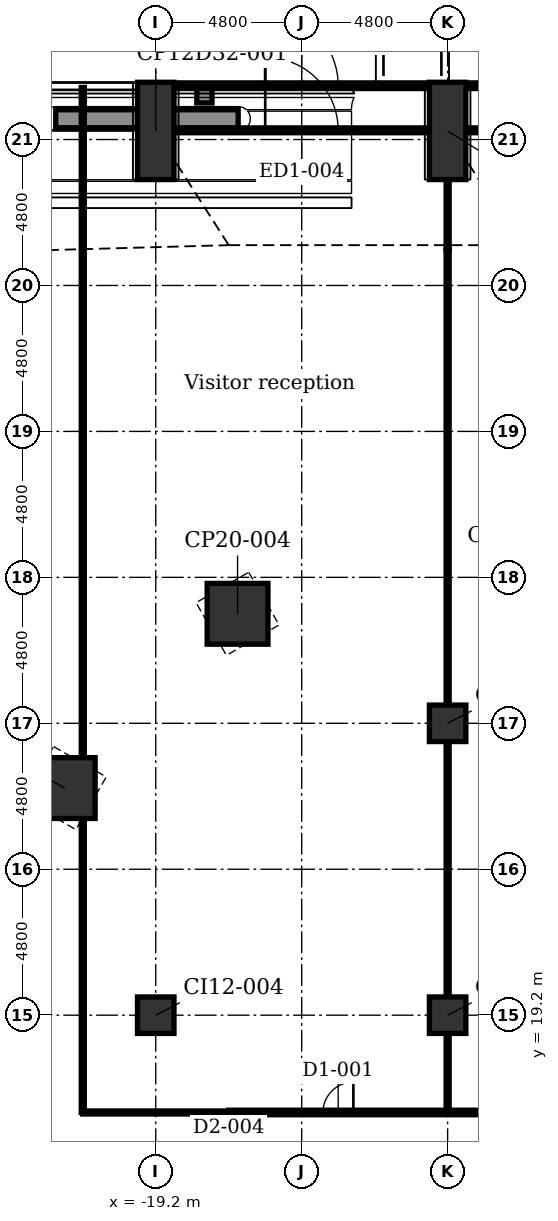
"""IFC4 building model, lengths in metres.
Left out: names, types, materials, properties, quantities, classifications, styles, units other than length and angle.
Written with IfcOpenShell. Run it as: python <this file> out.ifc"""

import sys

from ifc_helpers import new_model, si_unit, direction, frame, frame_2d, origin, origin_2d, place, context, subcontext, project, spatial, rectangle, extrude, element, fill, save


model = new_model("IFC4")
c1 = context("Model", 3, precision=1e-05, world=origin(), true_north=direction((0.0, 1.0)))
c2 = subcontext(c1, "Body", "Model", "MODEL_VIEW")
j1 = project(units=[si_unit("LENGTHUNIT", "METRE"), si_unit("PLANEANGLEUNIT", "RADIAN")], contexts=[c1])
p1 = place(None, origin())
s1 = spatial("IfcSite", under=j1, at=p1, CompositionType="ELEMENT")
p2 = place(p1, origin())
s2 = spatial("IfcBuilding", under=s1, at=p2, CompositionType="ELEMENT")
p3 = place(p2, origin())
s3 = spatial("IfcBuildingStorey", under=s2, at=p3, CompositionType="ELEMENT", Elevation=0.0)
for number, where, z_axis, x_axis in (
    (1, (-19.2, 48.283, -0.4), (0.0, 0.0, 1.0), (1.0, 0.0, 0.0)),
    (2, (-9.6, 48.283, -0.4), (0.0, 0.0, 1.0), (1.0, 0.0, 0.0)),
):
    element("IfcColumn", number, at=place(p3, frame(where, z_axis=z_axis, x_axis=x_axis)), inside=s3, PredefinedType="COLUMN", context=c2, shape_type="SweptSolid", body=[
        extrude(rectangle(XDim=1.2, YDim=3.2, at=origin_2d()), origin(), (0.0, 0.0, 1.0), 7.1),
    ])
for number, where, z_axis, x_axis in (
    (3, (-22.194, 26.67, -0.4), (0.0, 0.0, 1.0), (0.5, 0.866, 0.0)),
    (4, (-16.509, 32.401, -0.4), (0.0, 0.0, 1.0), (0.866, 0.5, 0.0)),
):
    element("IfcColumn", number, at=place(p3, frame(where, z_axis=z_axis, x_axis=x_axis)), inside=s3, PredefinedType="COLUMN", context=c2, shape_type="SweptSolid", body=[
        extrude(rectangle(XDim=2.0, YDim=2.0, at=origin_2d()), origin(), (0.0, 0.0, 1.0), 7.1),
    ])
for number, where, z_axis, x_axis in (
    (5, (-19.2, 19.2, -0.4), (0.0, 0.0, 1.0), (1.0, 0.0, 0.0)),
    (6, (-9.6, 19.2, -0.4), (0.0, 0.0, 1.0), (1.0, 0.0, 0.0)),
    (7, (-9.6, 28.8, -0.4), (0.0, 0.0, 1.0), (1.0, 0.0, 0.0)),
):
    element("IfcColumn", number, at=place(p3, frame(where, z_axis=z_axis, x_axis=x_axis)), inside=s3, PredefinedType="COLUMN", context=c2, shape_type="SweptSolid", body=[
        extrude(rectangle(XDim=1.2, YDim=1.2, at=origin_2d()), origin(), (0.0, 0.0, 1.0), 7.1),
    ])
p4 = place(p3, frame((-18.598, 48.303, 0.0), z_axis=(0.0, 0.0, 1.0), x_axis=(1.0, 0.0, 0.0)))
e8 = element("IfcWall", 8, at=p4, inside=s3, PredefinedType="PARTITIONING", context=c2, shape_type="SweptSolid", body=[
    extrude(rectangle(XDim=8.396, YDim=0.16, at=frame_2d((4.198, 0.0))), origin(), (0.0, 0.0, 1.0), 6.7),
])
p5 = place(p4, frame((2.998, 0.0, 0.0)))
e9 = element("IfcOpeningElement", 9, at=p5, cuts=e8, PredefinedType="OPENING", context=c2, shape_type="SweptSolid", body=[
    extrude(rectangle(XDim=2.4, YDim=2.4, at=frame_2d((1.2, 1.2))), frame((0.0, 0.09, 0.0), z_axis=(0.0, -1.0, 0.0), x_axis=(1.0, 0.0, 0.0)), (0.0, 0.0, 1.0), 0.18),
])
p6 = place(p3, frame((-8.998, 48.303, 0.0), z_axis=(0.0, 0.0, 1.0), x_axis=(1.0, 0.0, 0.0)))
e10 = element("IfcWall", 10, at=p6, inside=s3, PredefinedType="PARTITIONING", context=c2, shape_type="SweptSolid", body=[
    extrude(rectangle(XDim=8.396, YDim=0.16, at=frame_2d((4.198, 0.0))), origin(), (0.0, 0.0, 1.0), 6.7),
])
p7 = place(p6, frame((2.998, 0.0, 0.0)))
e11 = element("IfcOpeningElement", 11, at=p7, cuts=e10, PredefinedType="OPENING", context=c2, shape_type="SweptSolid", body=[
    extrude(rectangle(XDim=2.4, YDim=2.4, at=frame_2d((1.2, 1.2))), frame((0.0, 0.09, 0.0), z_axis=(0.0, -1.0, 0.0), x_axis=(1.0, 0.0, 0.0)), (0.0, 0.0, 1.0), 0.18),
])
p8 = place(p3, frame((-18.596, 49.783, 0.0), z_axis=(0.0, 0.0, 1.0), x_axis=(1.0, 0.0, 0.0)))
e12 = element("IfcWall", 12, at=p8, inside=s3, PredefinedType="PARTITIONING", context=c2, shape_type="SweptSolid", body=[
    extrude(rectangle(XDim=8.392, YDim=0.16, at=frame_2d((4.196, 0.0))), origin(), (0.0, 0.0, 1.0), 6.7),
])
p9 = place(p8, frame((2.996, 0.0, 0.0)))
e13 = element("IfcOpeningElement", 13, at=p9, cuts=e12, PredefinedType="OPENING", context=c2, shape_type="SweptSolid", body=[
    extrude(rectangle(XDim=2.4, YDim=2.4, at=frame_2d((1.2, 1.2))), frame((0.0, 0.09, 0.0), z_axis=(0.0, -1.0, 0.0), x_axis=(1.0, 0.0, 0.0)), (0.0, 0.0, 1.0), 0.18),
])
p10 = place(p3, frame((-8.996, 49.783, 0.0), z_axis=(0.0, 0.0, 1.0), x_axis=(1.0, 0.0, 0.0)))
e14 = element("IfcWall", 14, at=p10, inside=s3, PredefinedType="PARTITIONING", context=c2, shape_type="SweptSolid", body=[
    extrude(rectangle(XDim=8.392, YDim=0.16, at=frame_2d((4.196, 0.0))), origin(), (0.0, 0.0, 1.0), 6.7),
])
p11 = place(p10, frame((2.996, 0.0, 0.0)))
e15 = element("IfcOpeningElement", 15, at=p11, cuts=e14, PredefinedType="OPENING", context=c2, shape_type="SweptSolid", body=[
    extrude(rectangle(XDim=2.4, YDim=2.4, at=frame_2d((1.2, 1.2))), frame((0.0, 0.09, 0.0), z_axis=(0.0, -1.0, 0.0), x_axis=(1.0, 0.0, 0.0)), (0.0, 0.0, 1.0), 0.18),
])
p12 = place(p3, frame((-22.489, 48.683, 7.0), z_axis=(0.0, 0.0, 1.0), x_axis=(1.0, 0.0, 0.0)))
e16 = element("IfcWall", 16, at=p12, inside=s3, PredefinedType="USERDEFINED", context=c2, shape_type="SweptSolid", body=[
    extrude(rectangle(XDim=6.0, YDim=0.6, at=frame_2d((3.0, 0.0))), origin(), (0.0, 0.0, 1.0), 0.7),
])
p13 = place(p3, frame((-17.85, 49.453, 0.0), z_axis=(0.0, 0.0, 1.0), x_axis=(1.0, 0.0, 0.0)))
e17 = element("IfcWall", 17, at=p13, inside=s3, PredefinedType="SOLIDWALL", context=c2, shape_type="SweptSolid", body=[
    extrude(rectangle(XDim=0.5, YDim=0.5, at=frame_2d((0.25, 0.0))), origin(), (0.0, 0.0, 1.0), 6.4),
])
p14 = place(p3, frame((-9.6, 29.36, 0.0), z_axis=(0.0, 0.0, 1.0), x_axis=(0.0, 1.0, 0.0)))
e18 = element("IfcWall", 18, at=p14, inside=s3, PredefinedType="PARTITIONING", context=c2, shape_type="SweptSolid", body=[
    extrude(rectangle(XDim=15.006, YDim=0.1, at=frame_2d((7.503, 0.0))), origin(), (0.0, 0.0, 1.0), 6.016),
])
p15 = place(p3, frame((-9.6, 16.0, 0.0), z_axis=(0.0, 0.0, 1.0), x_axis=(0.0, 1.0, 0.0)))
e19 = element("IfcWall", 19, at=p15, inside=s3, PredefinedType="PARTITIONING", context=c2, shape_type="SweptSolid", body=[
    extrude(rectangle(XDim=2.64, YDim=0.1, at=frame_2d((1.32, 0.0))), origin(), (0.0, 0.0, 1.0), 6.293),
])
p16 = place(p3, frame((-9.6, 18.64, 0.0), z_axis=(0.0, 0.0, 1.0), x_axis=(0.0, 1.0, 0.0)))
e20 = element("IfcWall", 20, at=p16, inside=s3, PredefinedType="PARTITIONING", context=c2, shape_type="SweptSolid", body=[
    extrude(rectangle(XDim=1.12, YDim=0.1, at=frame_2d((0.56, 0.0))), origin(), (0.0, 0.0, 1.0), 6.7),
])
p17 = place(p3, frame((-9.6, 19.76, 0.0), z_axis=(0.0, 0.0, 1.0), x_axis=(0.0, 1.0, 0.0)))
e21 = element("IfcWall", 21, at=p17, inside=s3, PredefinedType="PARTITIONING", context=c2, shape_type="SweptSolid", body=[
    extrude(rectangle(XDim=8.48, YDim=0.1, at=frame_2d((4.24, 0.0))), origin(), (0.0, 0.0, 1.0), 6.293),
])
p18 = place(p3, frame((-9.6, 28.24, 0.0), z_axis=(0.0, 0.0, 1.0), x_axis=(0.0, 1.0, 0.0)))
e22 = element("IfcWall", 22, at=p18, inside=s3, PredefinedType="PARTITIONING", context=c2, shape_type="SweptSolid", body=[
    extrude(rectangle(XDim=1.12, YDim=0.1, at=frame_2d((0.56, 0.0))), origin(), (0.0, 0.0, 1.0), 6.7),
])
p19 = place(p3, frame((-9.6, 44.366, 0.0), z_axis=(0.0, 0.0, 1.0), x_axis=(0.0, 1.0, 0.0)))
e23 = element("IfcWall", 23, at=p19, inside=s3, PredefinedType="PARTITIONING", context=c2, shape_type="SweptSolid", body=[
    extrude(rectangle(XDim=5.347, YDim=0.1, at=frame_2d((2.673, 0.0))), origin(), (0.0, 0.0, 1.0), 6.7),
])
p20 = place(p3, frame((-16.8, 3.95, 0.0), z_axis=(0.0, 0.0, 1.0), x_axis=(0.0, 1.0, 0.0)))
e24 = element("IfcWall", 24, at=p20, inside=s3, PredefinedType="PARTITIONING", context=c2, shape_type="SweptSolid", body=[
    extrude(rectangle(XDim=12.05, YDim=0.15, at=frame_2d((6.025, 0.0))), origin(), (0.0, 0.0, 1.0), 6.7),
])
p21 = place(p20, frame((0.95, 0.0, 0.0)))
e25 = element("IfcOpeningElement", 25, at=p21, cuts=e24, PredefinedType="OPENING", context=c2, shape_type="SweptSolid", body=[
    extrude(rectangle(XDim=1.0, YDim=2.1, at=frame_2d((0.5, 1.05))), frame((0.0, 0.085, 0.0), z_axis=(0.0, -1.0, 0.0), x_axis=(1.0, 0.0, 0.0)), (0.0, 0.0, 1.0), 0.17),
])
p22 = place(p20, frame((8.645, 0.0, 0.0)))
e26 = element("IfcOpeningElement", 26, at=p22, cuts=e24, PredefinedType="OPENING", context=c2, shape_type="SweptSolid", body=[
    extrude(rectangle(XDim=1.8, YDim=2.1, at=frame_2d((0.9, 1.05))), frame((0.0, 0.085, 0.0), z_axis=(0.0, -1.0, 0.0), x_axis=(1.0, 0.0, 0.0)), (0.0, 0.0, 1.0), 0.17),
])
p23 = place(p3, frame((-21.6, 16.0, 0.0), z_axis=(0.0, 0.0, 1.0), x_axis=(0.0, 1.0, 0.0)))
e27 = element("IfcWall", 27, at=p23, inside=s3, PredefinedType="PARTITIONING", context=c2, shape_type="SweptSolid", body=[
    extrude(rectangle(XDim=33.713, YDim=0.1, at=frame_2d((16.856, 0.0))), origin(), (0.0, 0.0, 1.0), 6.7),
])
p24 = place(p3, frame((-21.6, 16.0, 0.0), z_axis=(0.0, 0.0, 1.0), x_axis=(1.0, 0.0, 0.0)))
e28 = element("IfcWall", 28, at=p24, inside=s3, PredefinedType="PARTITIONING", context=c2, shape_type="SweptSolid", body=[
    extrude(rectangle(XDim=4.8, YDim=0.1, at=frame_2d((2.4, 0.0))), origin(), (0.0, 0.0, 1.0), 6.7),
])
p25 = place(p3, frame((-16.8, 16.0, 0.0), z_axis=(0.0, 0.0, 1.0), x_axis=(1.0, 0.0, 0.0)))
e29 = element("IfcWall", 29, at=p25, inside=s3, PredefinedType="PARTITIONING", context=c2, shape_type="SweptSolid", body=[
    extrude(rectangle(XDim=33.6, YDim=0.15, at=frame_2d((16.8, 0.0))), origin(), (0.0, 0.0, 1.0), 6.7),
])
p26 = place(p25, frame((3.1, 0.0, 0.0)))
e30 = element("IfcOpeningElement", 30, at=p26, cuts=e29, PredefinedType="OPENING", context=c2, shape_type="SweptSolid", body=[
    extrude(rectangle(XDim=1.0, YDim=2.1, at=frame_2d((0.5, 1.05))), frame((0.0, 0.085, 0.0), z_axis=(0.0, -1.0, 0.0), x_axis=(1.0, 0.0, 0.0)), (0.0, 0.0, 1.0), 0.17),
])
p27 = place(p25, frame((12.1, 0.0, 0.0)))
e31 = element("IfcOpeningElement", 31, at=p27, cuts=e29, PredefinedType="OPENING", context=c2, shape_type="SweptSolid", body=[
    extrude(rectangle(XDim=1.0, YDim=2.1, at=frame_2d((0.5, 1.05))), frame((0.0, 0.085, 0.0), z_axis=(0.0, -1.0, 0.0), x_axis=(1.0, 0.0, 0.0)), (0.0, 0.0, 1.0), 0.17),
])
p28 = place(p25, frame((29.5, 0.0, 0.0)))
e32 = element("IfcOpeningElement", 32, at=p28, cuts=e29, PredefinedType="OPENING", context=c2, shape_type="SweptSolid", body=[
    extrude(rectangle(XDim=1.0, YDim=2.1, at=frame_2d((0.5, 1.05))), frame((0.0, 0.085, 0.0), z_axis=(0.0, -1.0, 0.0), x_axis=(1.0, 0.0, 0.0)), (0.0, 0.0, 1.0), 0.17),
])
p29 = place(p25, frame((23.735, 0.0, 0.0)))
e33 = element("IfcOpeningElement", 33, at=p29, cuts=e29, PredefinedType="OPENING", context=c2, shape_type="SweptSolid", body=[
    extrude(rectangle(XDim=1.0, YDim=2.1, at=frame_2d((0.5, 1.05))), frame((0.0, 0.085, 0.0), z_axis=(0.0, -1.0, 0.0), x_axis=(1.0, 0.0, 0.0)), (0.0, 0.0, 1.0), 0.17),
])
p30 = place(p25, frame((18.4, 0.0, 0.0)))
e34 = element("IfcOpeningElement", 34, at=p30, cuts=e29, PredefinedType="OPENING", context=c2, shape_type="SweptSolid", body=[
    extrude(rectangle(XDim=1.0, YDim=2.1, at=frame_2d((0.5, 1.05))), frame((0.0, 0.085, 0.0), z_axis=(0.0, -1.0, 0.0), x_axis=(1.0, 0.0, 0.0)), (0.0, 0.0, 1.0), 0.17),
])
p31 = place(p5, origin())
e35 = element("IfcDoor", 35, at=p31, inside=s3, OperationType="DOUBLE_DOOR_DOUBLE_SWING", PredefinedType="DOOR", context=c2, shape_type="SweptSolid", body=[
    extrude(rectangle(XDim=2.4, YDim=2.4, at=frame_2d((1.2, 1.2))), frame((0.0, 0.025, 0.0), z_axis=(0.0, -1.0, 0.0), x_axis=(1.0, 0.0, 0.0)), (0.0, 0.0, 1.0), 0.05),
])
fill(e9, e35)
p32 = place(p9, origin())
e36 = element("IfcDoor", 36, at=p32, inside=s3, OperationType="DOUBLE_DOOR_DOUBLE_SWING", PredefinedType="DOOR", context=c2, shape_type="SweptSolid", body=[
    extrude(rectangle(XDim=2.4, YDim=2.4, at=frame_2d((1.2, 1.2))), frame((0.0, 0.025, 0.0), z_axis=(0.0, -1.0, 0.0), x_axis=(1.0, 0.0, 0.0)), (0.0, 0.0, 1.0), 0.05),
])
fill(e13, e36)
p33 = place(p26, origin())
e37 = element("IfcDoor", 37, at=p33, inside=s3, OperationType="SINGLE_SWING_RIGHT", PredefinedType="DOOR", context=c2, shape_type="SweptSolid", body=[
    extrude(rectangle(XDim=1.0, YDim=2.1, at=frame_2d((0.5, 1.05))), frame((0.0, 0.025, 0.0), z_axis=(0.0, -1.0, 0.0), x_axis=(1.0, 0.0, 0.0)), (0.0, 0.0, 1.0), 0.05),
])
fill(e30, e37)
save(model, sys.argv[1])
